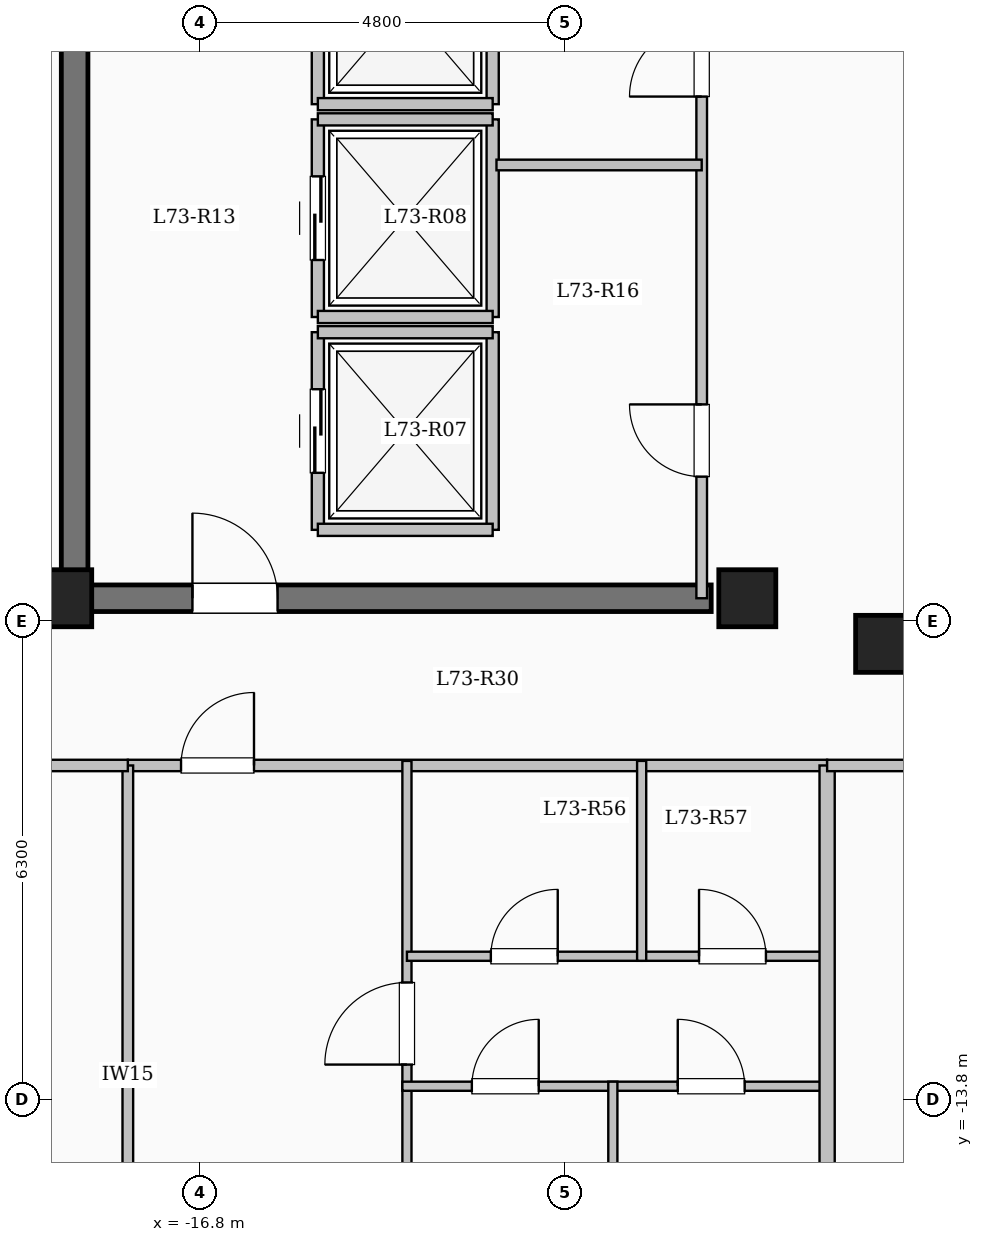
"""IFC4 building model, lengths in metres.
Left out: names, types, materials, properties, quantities, classifications, styles, units other than length and angle.
Written with IfcOpenShell. Run it as: python <this file> out.ifc"""

import sys

from ifc_helpers import new_model, si_unit, direction, frame, frame_2d, origin, origin_2d, place, context, subcontext, project, spatial, rectangle, extrude, element, fill, save


model = new_model("IFC4")
c1 = context("Model", 3, precision=1e-05, world=origin(), true_north=direction((0.0, 1.0)))
c2 = subcontext(c1, "Body", "Model", "MODEL_VIEW")
j1 = project(units=[si_unit("LENGTHUNIT", "METRE"), si_unit("PLANEANGLEUNIT", "RADIAN")], contexts=[c1])
p1 = place(None, origin())
s1 = spatial("IfcSite", under=j1, at=p1, CompositionType="ELEMENT")
p2 = place(p1, origin())
s2 = spatial("IfcBuilding", under=s1, at=p2, CompositionType="ELEMENT")
p3 = place(p2, frame((0.0, 0.0, 268.3)))
s3 = spatial("IfcBuildingStorey", under=s2, at=p3, CompositionType="ELEMENT", Elevation=268.3)
for number, where, z_axis, x_axis in (
    (1, (-7.8, -7.8, 0.0), (0.0, 0.0, 1.0), (1.0, 0.0, 0.0)),
    (2, (-9.6, -7.2, 0.0), (0.0, 0.0, 1.0), (1.0, 0.0, 0.0)),
    (3, (-18.6, -7.2, 0.0), (0.0, 0.0, 1.0), (1.0, 0.0, 0.0)),
):
    element("IfcColumn", number, at=place(p3, frame(where, z_axis=z_axis, x_axis=x_axis)), inside=s3, PredefinedType="COLUMN", context=c2, shape_type="SweptSolid", body=[
        extrude(rectangle(XDim=0.75, YDim=0.75, at=origin_2d()), origin(), (0.0, 0.0, 1.0), 3.35),
    ])
p4 = place(p3, frame((-15.25, -6.3, 0.0), z_axis=(0.0, 0.0, 1.0), x_axis=(0.0, 1.0, 0.0)))
e4 = element("IfcWall", 4, at=p4, inside=s3, PredefinedType="SOLIDWALL", context=c2, shape_type="SweptSolid", body=[
    extrude(rectangle(XDim=2.6, YDim=0.16, at=frame_2d((1.3, 0.0))), origin(), (0.0, 0.0, 1.0), 3.05),
])
p5 = place(p4, frame((0.75, 0.0, 0.0)))
e5 = element("IfcOpeningElement", 5, at=p5, cuts=e4, PredefinedType="OPENING", context=c2, shape_type="SweptSolid", body=[
    extrude(rectangle(XDim=1.1, YDim=2.15, at=frame_2d((0.55, 1.075))), frame((0.0, 0.09, 0.0), z_axis=(0.0, -1.0, 0.0), x_axis=(1.0, 0.0, 0.0)), (0.0, 0.0, 1.0), 0.18),
])
p6 = place(p3, frame((-12.95, -6.3, 0.0), z_axis=(0.0, 0.0, 1.0), x_axis=(0.0, 1.0, 0.0)))
e6 = element("IfcWall", 6, at=p6, inside=s3, PredefinedType="SOLIDWALL", context=c2, shape_type="SweptSolid", body=[
    extrude(rectangle(XDim=2.6, YDim=0.16, at=frame_2d((1.3, 0.0))), origin(), (0.0, 0.0, 1.0), 3.05),
])
for number, where, z_axis, x_axis in (
    (7, (-15.25, -6.3, 0.0), (0.0, 0.0, 1.0), (1.0, 0.0, 0.0)),
    (8, (-15.25, -3.7, 0.0), (0.0, 0.0, 1.0), (1.0, 0.0, 0.0)),
):
    element("IfcWall", number, at=place(p3, frame(where, z_axis=z_axis, x_axis=x_axis)), inside=s3, PredefinedType="SOLIDWALL", context=c2, shape_type="SweptSolid", body=[
        extrude(rectangle(XDim=2.3, YDim=0.16, at=frame_2d((1.15, 0.0))), origin(), (0.0, 0.0, 1.0), 3.05),
    ])
p7 = place(p3, frame((-15.25, -3.5, 0.0), z_axis=(0.0, 0.0, 1.0), x_axis=(0.0, 1.0, 0.0)))
e9 = element("IfcWall", 9, at=p7, inside=s3, PredefinedType="SOLIDWALL", context=c2, shape_type="SweptSolid", body=[
    extrude(rectangle(XDim=2.6, YDim=0.16, at=frame_2d((1.3, 0.0))), origin(), (0.0, 0.0, 1.0), 3.05),
])
p8 = place(p7, frame((0.75, 0.0, 0.0)))
e10 = element("IfcOpeningElement", 10, at=p8, cuts=e9, PredefinedType="OPENING", context=c2, shape_type="SweptSolid", body=[
    extrude(rectangle(XDim=1.1, YDim=2.15, at=frame_2d((0.55, 1.075))), frame((0.0, 0.09, 0.0), z_axis=(0.0, -1.0, 0.0), x_axis=(1.0, 0.0, 0.0)), (0.0, 0.0, 1.0), 0.18),
])
p9 = place(p3, frame((-12.95, -3.5, 0.0), z_axis=(0.0, 0.0, 1.0), x_axis=(0.0, 1.0, 0.0)))
e11 = element("IfcWall", 11, at=p9, inside=s3, PredefinedType="SOLIDWALL", context=c2, shape_type="SweptSolid", body=[
    extrude(rectangle(XDim=2.6, YDim=0.16, at=frame_2d((1.3, 0.0))), origin(), (0.0, 0.0, 1.0), 3.05),
])
for number, where, z_axis, x_axis in (
    (12, (-15.25, -3.5, 0.0), (0.0, 0.0, 1.0), (1.0, 0.0, 0.0)),
    (13, (-15.25, -0.9, 0.0), (0.0, 0.0, 1.0), (1.0, 0.0, 0.0)),
):
    element("IfcWall", number, at=place(p3, frame(where, z_axis=z_axis, x_axis=x_axis)), inside=s3, PredefinedType="SOLIDWALL", context=c2, shape_type="SweptSolid", body=[
        extrude(rectangle(XDim=2.3, YDim=0.16, at=frame_2d((1.15, 0.0))), origin(), (0.0, 0.0, 1.0), 3.05),
    ])
p10 = place(p3, frame((-15.25, -0.7, 0.0), z_axis=(0.0, 0.0, 1.0), x_axis=(0.0, 1.0, 0.0)))
e14 = element("IfcWall", 14, at=p10, inside=s3, PredefinedType="SOLIDWALL", context=c2, shape_type="SweptSolid", body=[
    extrude(rectangle(XDim=2.6, YDim=0.16, at=frame_2d((1.3, 0.0))), origin(), (0.0, 0.0, 1.0), 3.05),
])
p11 = place(p10, frame((0.75, 0.0, 0.0)))
e15 = element("IfcOpeningElement", 15, at=p11, cuts=e14, PredefinedType="OPENING", context=c2, shape_type="SweptSolid", body=[
    extrude(rectangle(XDim=1.1, YDim=2.15, at=frame_2d((0.55, 1.075))), frame((0.0, 0.09, 0.0), z_axis=(0.0, -1.0, 0.0), x_axis=(1.0, 0.0, 0.0)), (0.0, 0.0, 1.0), 0.18),
])
p12 = place(p3, frame((-12.95, -0.7, 0.0), z_axis=(0.0, 0.0, 1.0), x_axis=(0.0, 1.0, 0.0)))
e16 = element("IfcWall", 16, at=p12, inside=s3, PredefinedType="SOLIDWALL", context=c2, shape_type="SweptSolid", body=[
    extrude(rectangle(XDim=2.6, YDim=0.16, at=frame_2d((1.3, 0.0))), origin(), (0.0, 0.0, 1.0), 3.05),
])
p13 = place(p3, frame((-15.25, -0.7, 0.0), z_axis=(0.0, 0.0, 1.0), x_axis=(1.0, 0.0, 0.0)))
e17 = element("IfcWall", 17, at=p13, inside=s3, PredefinedType="SOLIDWALL", context=c2, shape_type="SweptSolid", body=[
    extrude(rectangle(XDim=2.3, YDim=0.16, at=frame_2d((1.15, 0.0))), origin(), (0.0, 0.0, 1.0), 3.05),
])
p14 = place(p3, frame((-18.45, -7.375, 0.0), z_axis=(0.0, 0.0, 1.0), x_axis=(0.0, 1.0, 0.0)))
e18 = element("IfcWall", 18, at=p14, inside=s3, PredefinedType="SHEAR", context=c2, shape_type="SweptSolid", body=[
    extrude(rectangle(XDim=14.05, YDim=0.35, at=frame_2d((7.025, 0.0))), origin(), (0.0, 0.0, 1.0), 3.35),
])
p15 = place(p3, frame((-18.625, -7.2, 0.0), z_axis=(0.0, 0.0, 1.0), x_axis=(1.0, 0.0, 0.0)))
e19 = element("IfcWall", 19, at=p15, inside=s3, PredefinedType="SHEAR", context=c2, shape_type="SweptSolid", body=[
    extrude(rectangle(XDim=8.55, YDim=0.35, at=frame_2d((4.275, 0.0))), origin(), (0.0, 0.0, 1.0), 3.35),
])
p16 = place(p15, frame((1.725, 0.0, 0.0)))
e20 = element("IfcOpeningElement", 20, at=p16, cuts=e19, PredefinedType="OPENING", context=c2, shape_type="SweptSolid", body=[
    extrude(rectangle(XDim=1.12, YDim=2.15, at=frame_2d((0.56, 1.075))), frame((0.0, 0.185, 0.0), z_axis=(0.0, -1.0, 0.0), x_axis=(1.0, 0.0, 0.0)), (0.0, 0.0, 1.0), 0.37),
])
p17 = place(p3, frame((-10.2, -7.2, 0.0), z_axis=(0.0, 0.0, 1.0), x_axis=(0.0, 1.0, 0.0)))
e21 = element("IfcWall", 21, at=p17, inside=s3, PredefinedType="PARTITIONING", context=c2, shape_type="SweptSolid", body=[
    extrude(rectangle(XDim=9.12, YDim=0.14, at=frame_2d((4.56, 0.0))), origin(), (0.0, 0.0, 1.0), 3.05),
])
p18 = place(p17, frame((1.6, 0.0, 0.0)))
e22 = element("IfcOpeningElement", 22, at=p18, cuts=e21, PredefinedType="OPENING", context=c2, shape_type="SweptSolid", body=[
    extrude(rectangle(XDim=0.95, YDim=2.12, at=frame_2d((0.475, 1.06))), frame((0.0, 0.08, 0.0), z_axis=(0.0, -1.0, 0.0), x_axis=(1.0, 0.0, 0.0)), (0.0, 0.0, 1.0), 0.16),
])
p19 = place(p17, frame((6.6, 0.0, 0.0)))
e23 = element("IfcOpeningElement", 23, at=p19, cuts=e21, PredefinedType="OPENING", context=c2, shape_type="SweptSolid", body=[
    extrude(rectangle(XDim=0.95, YDim=2.12, at=frame_2d((0.475, 1.06))), frame((0.0, 0.08, 0.0), z_axis=(0.0, -1.0, 0.0), x_axis=(1.0, 0.0, 0.0)), (0.0, 0.0, 1.0), 0.16),
])
p20 = place(p3, frame((-12.9, -1.5, 0.0), z_axis=(0.0, 0.0, 1.0), x_axis=(1.0, 0.0, 0.0)))
e24 = element("IfcWall", 24, at=p20, inside=s3, PredefinedType="PARTITIONING", context=c2, shape_type="SweptSolid", body=[
    extrude(rectangle(XDim=2.7, YDim=0.14, at=frame_2d((1.35, 0.0))), origin(), (0.0, 0.0, 1.0), 3.05),
])
p21 = place(p3, frame((-17.75, -9.4, 0.0), z_axis=(0.0, 0.0, 1.0), x_axis=(1.0, 0.0, 0.0)))
e25 = element("IfcWall", 25, at=p21, inside=s3, PredefinedType="PARTITIONING", context=c2, shape_type="SweptSolid", body=[
    extrude(rectangle(XDim=9.2, YDim=0.15, at=frame_2d((4.6, 0.0))), origin(), (0.0, 0.0, 1.0), 3.05),
])
p22 = place(p21, frame((0.7, 0.0, 0.0)))
e26 = element("IfcOpeningElement", 26, at=p22, cuts=e25, PredefinedType="OPENING", context=c2, shape_type="SweptSolid", body=[
    extrude(rectangle(XDim=0.96, YDim=2.15, at=frame_2d((0.48, 1.075))), frame((0.0, 0.085, 0.0), z_axis=(0.0, -1.0, 0.0), x_axis=(1.0, 0.0, 0.0)), (0.0, 0.0, 1.0), 0.17),
])
p23 = place(p3, frame((-14.078, -20.9, 0.0), z_axis=(0.0, 0.0, 1.0), x_axis=(0.0, 1.0, 0.0)))
e27 = element("IfcWall", 27, at=p23, inside=s3, PredefinedType="PARTITIONING", context=c2, shape_type="SweptSolid", body=[
    extrude(rectangle(XDim=11.56, YDim=0.12, at=frame_2d((5.78, 0.0))), origin(), (0.0, 0.0, 1.0), 3.05),
])
p24 = place(p23, frame((7.565, 0.0, 0.0)))
e28 = element("IfcOpeningElement", 28, at=p24, cuts=e27, PredefinedType="OPENING", context=c2, shape_type="SweptSolid", body=[
    extrude(rectangle(XDim=1.08, YDim=2.15, at=frame_2d((0.54, 1.075))), frame((0.0, 0.07, 0.0), z_axis=(0.0, -1.0, 0.0), x_axis=(1.0, 0.0, 0.0)), (0.0, 0.0, 1.0), 0.14),
])
p25 = place(p3, frame((-14.078, -11.91, 0.0), z_axis=(0.0, 0.0, 1.0), x_axis=(1.0, 0.0, 0.0)))
e29 = element("IfcWall", 29, at=p25, inside=s3, PredefinedType="PARTITIONING", context=c2, shape_type="SweptSolid", body=[
    extrude(rectangle(XDim=3.088, YDim=0.12, at=frame_2d((1.544, 0.0))), origin(), (0.0, 0.0, 1.0), 3.05),
])
p26 = place(p25, frame((1.104, 0.0, 0.0)))
e30 = element("IfcOpeningElement", 30, at=p26, cuts=e29, PredefinedType="OPENING", context=c2, shape_type="SweptSolid", body=[
    extrude(rectangle(XDim=0.88, YDim=2.1, at=frame_2d((0.44, 1.05))), frame((0.0, 0.07, 0.0), z_axis=(0.0, -1.0, 0.0), x_axis=(1.0, 0.0, 0.0)), (0.0, 0.0, 1.0), 0.14),
])
p27 = place(p3, frame((-10.99, -11.91, 0.0), z_axis=(0.0, 0.0, 1.0), x_axis=(1.0, 0.0, 0.0)))
e31 = element("IfcWall", 31, at=p27, inside=s3, PredefinedType="PARTITIONING", context=c2, shape_type="SweptSolid", body=[
    extrude(rectangle(XDim=2.39, YDim=0.12, at=frame_2d((1.195, 0.0))), origin(), (0.0, 0.0, 1.0), 3.05),
])
p28 = place(p27, frame((0.755, 0.0, 0.0)))
e32 = element("IfcOpeningElement", 32, at=p28, cuts=e31, PredefinedType="OPENING", context=c2, shape_type="SweptSolid", body=[
    extrude(rectangle(XDim=0.88, YDim=2.1, at=frame_2d((0.44, 1.05))), frame((0.0, 0.07, 0.0), z_axis=(0.0, -1.0, 0.0), x_axis=(1.0, 0.0, 0.0)), (0.0, 0.0, 1.0), 0.14),
])
p29 = place(p3, frame((-14.138, -13.62, 0.0), z_axis=(0.0, 0.0, 1.0), x_axis=(1.0, 0.0, 0.0)))
e33 = element("IfcWall", 33, at=p29, inside=s3, PredefinedType="PARTITIONING", context=c2, shape_type="SweptSolid", body=[
    extrude(rectangle(XDim=5.598, YDim=0.12, at=frame_2d((2.799, 0.0))), origin(), (0.0, 0.0, 1.0), 3.05),
])
p30 = place(p29, frame((0.914, 0.0, 0.0)))
e34 = element("IfcOpeningElement", 34, at=p30, cuts=e33, PredefinedType="OPENING", context=c2, shape_type="SweptSolid", body=[
    extrude(rectangle(XDim=0.88, YDim=2.1, at=frame_2d((0.44, 1.05))), frame((0.0, 0.07, 0.0), z_axis=(0.0, -1.0, 0.0), x_axis=(1.0, 0.0, 0.0)), (0.0, 0.0, 1.0), 0.14),
])
p31 = place(p29, frame((3.623, 0.0, 0.0)))
e35 = element("IfcOpeningElement", 35, at=p31, cuts=e33, PredefinedType="OPENING", context=c2, shape_type="SweptSolid", body=[
    extrude(rectangle(XDim=0.88, YDim=2.1, at=frame_2d((0.44, 1.05))), frame((0.0, 0.07, 0.0), z_axis=(0.0, -1.0, 0.0), x_axis=(1.0, 0.0, 0.0)), (0.0, 0.0, 1.0), 0.14),
])
p32 = place(p3, frame((-10.99, -11.97, 0.0), z_axis=(0.0, 0.0, 1.0), x_axis=(0.0, 1.0, 0.0)))
e36 = element("IfcWall", 36, at=p32, inside=s3, PredefinedType="PARTITIONING", context=c2, shape_type="SweptSolid", body=[
    extrude(rectangle(XDim=2.63, YDim=0.12, at=frame_2d((1.315, 0.0))), origin(), (0.0, 0.0, 1.0), 3.05),
])
p33 = place(p3, frame((-11.369, -20.9, 0.0), z_axis=(0.0, 0.0, 1.0), x_axis=(0.0, 1.0, 0.0)))
e37 = element("IfcWall", 37, at=p33, inside=s3, PredefinedType="PARTITIONING", context=c2, shape_type="SweptSolid", body=[
    extrude(rectangle(XDim=7.34, YDim=0.12, at=frame_2d((3.67, 0.0))), origin(), (0.0, 0.0, 1.0), 3.05),
])
p34 = place(p3, frame((-8.55, -21.504, 0.0), z_axis=(0.0, 0.0, 1.0), x_axis=(0.0, 1.0, 0.0)))
e38 = element("IfcWall", 38, at=p34, inside=s3, PredefinedType="SOLIDWALL", context=c2, shape_type="SweptSolid", body=[
    extrude(rectangle(XDim=12.104, YDim=0.2, at=frame_2d((6.052, 0.0))), origin(), (0.0, 0.0, 1.0), 3.05),
])
p35 = place(p3, frame((-8.55, -9.4, 0.0), z_axis=(0.0, 0.0, 1.0), x_axis=(1.0, 0.0, 0.0)))
e39 = element("IfcWall", 39, at=p35, inside=s3, PredefinedType="PARTITIONING", context=c2, shape_type="SweptSolid", body=[
    extrude(rectangle(XDim=17.1, YDim=0.15, at=frame_2d((8.55, 0.0))), origin(), (0.0, 0.0, 1.0), 3.05),
])
p36 = place(p35, frame((1.75, 0.0, 0.0)))
e40 = element("IfcOpeningElement", 40, at=p36, cuts=e39, PredefinedType="OPENING", context=c2, shape_type="SweptSolid", body=[
    extrude(rectangle(XDim=0.96, YDim=2.15, at=frame_2d((0.48, 1.075))), frame((0.0, 0.085, 0.0), z_axis=(0.0, -1.0, 0.0), x_axis=(1.0, 0.0, 0.0)), (0.0, 0.0, 1.0), 0.17),
])
p37 = place(p3, frame((-22.68, -7.25, 0.0), z_axis=(0.0, 0.0, 1.0), x_axis=(1.0, 0.0, 0.0)))
e41 = element("IfcWall", 41, at=p37, inside=s3, PredefinedType="PARTITIONING", context=c2, shape_type="SweptSolid", body=[
    extrude(rectangle(XDim=4.23, YDim=0.15, at=frame_2d((2.115, 0.0))), origin(), (0.0, 0.0, 1.0), 3.05),
])
p38 = place(p37, frame((1.73, 0.0, 0.0)))
e42 = element("IfcOpeningElement", 42, at=p38, cuts=e41, PredefinedType="OPENING", context=c2, shape_type="SweptSolid", body=[
    extrude(rectangle(XDim=0.96, YDim=2.15, at=frame_2d((0.48, 1.075))), frame((0.0, 0.085, 0.0), z_axis=(0.0, -1.0, 0.0), x_axis=(1.0, 0.0, 0.0)), (0.0, 0.0, 1.0), 0.17),
])
p39 = place(p3, frame((-17.75, -17.55, 0.0), z_axis=(0.0, 0.0, 1.0), x_axis=(0.0, 1.0, 0.0)))
e43 = element("IfcWall", 43, at=p39, inside=s3, PredefinedType="PARTITIONING", context=c2, shape_type="SweptSolid", body=[
    extrude(rectangle(XDim=8.15, YDim=0.14, at=frame_2d((4.075, 0.0))), origin(), (0.0, 0.0, 1.0), 3.05),
])
p40 = place(p3, frame((-22.68, -9.4, 0.0), z_axis=(0.0, 0.0, 1.0), x_axis=(1.0, 0.0, 0.0)))
e44 = element("IfcWall", 44, at=p40, inside=s3, PredefinedType="PARTITIONING", context=c2, shape_type="SweptSolid", body=[
    extrude(rectangle(XDim=4.93, YDim=0.15, at=frame_2d((2.465, 0.0))), origin(), (0.0, 0.0, 1.0), 3.05),
])
p41 = place(p40, frame((1.99, 0.0, 0.0)))
e45 = element("IfcOpeningElement", 45, at=p41, cuts=e44, PredefinedType="OPENING", context=c2, shape_type="SweptSolid", body=[
    extrude(rectangle(XDim=0.95, YDim=2.15, at=frame_2d((0.475, 1.075))), frame((0.0, 0.085, 0.0), z_axis=(0.0, -1.0, 0.0), x_axis=(1.0, 0.0, 0.0)), (0.0, 0.0, 1.0), 0.17),
])
p42 = place(p5, origin())
e46 = element("IfcDoor", 46, at=p42, inside=s3, OperationType="SLIDING_TO_LEFT", PredefinedType="DOOR", context=c2, shape_type="SweptSolid", body=[
    extrude(rectangle(XDim=1.1, YDim=2.15, at=frame_2d((0.55, 1.075))), frame((0.0, 0.025, 0.0), z_axis=(0.0, -1.0, 0.0), x_axis=(1.0, 0.0, 0.0)), (0.0, 0.0, 1.0), 0.05),
])
fill(e5, e46)
p43 = place(p8, origin())
e47 = element("IfcDoor", 47, at=p43, inside=s3, OperationType="SLIDING_TO_LEFT", PredefinedType="DOOR", context=c2, shape_type="SweptSolid", body=[
    extrude(rectangle(XDim=1.1, YDim=2.15, at=frame_2d((0.55, 1.075))), frame((0.0, 0.025, 0.0), z_axis=(0.0, -1.0, 0.0), x_axis=(1.0, 0.0, 0.0)), (0.0, 0.0, 1.0), 0.05),
])
fill(e10, e47)
p44 = place(p16, origin())
e48 = element("IfcDoor", 48, at=p44, inside=s3, OperationType="SINGLE_SWING_LEFT", PredefinedType="DOOR", context=c2, shape_type="SweptSolid", body=[
    extrude(rectangle(XDim=1.12, YDim=2.15, at=frame_2d((0.56, 1.075))), frame((0.0, 0.025, 0.0), z_axis=(0.0, -1.0, 0.0), x_axis=(1.0, 0.0, 0.0)), (0.0, 0.0, 1.0), 0.05),
])
fill(e20, e48)
p45 = place(p18, origin())
e49 = element("IfcDoor", 49, at=p45, inside=s3, OperationType="SINGLE_SWING_RIGHT", PredefinedType="DOOR", context=c2, shape_type="SweptSolid", body=[
    extrude(rectangle(XDim=0.95, YDim=2.12, at=frame_2d((0.475, 1.06))), frame((0.0, 0.025, 0.0), z_axis=(0.0, -1.0, 0.0), x_axis=(1.0, 0.0, 0.0)), (0.0, 0.0, 1.0), 0.05),
])
fill(e22, e49)
p46 = place(p19, origin())
e50 = element("IfcDoor", 50, at=p46, inside=s3, OperationType="SINGLE_SWING_LEFT", PredefinedType="DOOR", context=c2, shape_type="SweptSolid", body=[
    extrude(rectangle(XDim=0.95, YDim=2.12, at=frame_2d((0.475, 1.06))), frame((0.0, 0.025, 0.0), z_axis=(0.0, -1.0, 0.0), x_axis=(1.0, 0.0, 0.0)), (0.0, 0.0, 1.0), 0.05),
])
fill(e23, e50)
p47 = place(p22, origin())
e51 = element("IfcDoor", 51, at=p47, inside=s3, OperationType="SINGLE_SWING_RIGHT", PredefinedType="DOOR", context=c2, shape_type="SweptSolid", body=[
    extrude(rectangle(XDim=0.96, YDim=2.15, at=frame_2d((0.48, 1.075))), frame((0.0, 0.025, 0.0), z_axis=(0.0, -1.0, 0.0), x_axis=(1.0, 0.0, 0.0)), (0.0, 0.0, 1.0), 0.05),
])
fill(e26, e51)
p48 = place(p24, origin())
e52 = element("IfcDoor", 52, at=p48, inside=s3, OperationType="SINGLE_SWING_LEFT", PredefinedType="DOOR", context=c2, shape_type="SweptSolid", body=[
    extrude(rectangle(XDim=1.08, YDim=2.15, at=frame_2d((0.54, 1.075))), frame((0.0, 0.025, 0.0), z_axis=(0.0, -1.0, 0.0), x_axis=(1.0, 0.0, 0.0)), (0.0, 0.0, 1.0), 0.05),
])
fill(e28, e52)
p49 = place(p26, origin())
e53 = element("IfcDoor", 53, at=p49, inside=s3, OperationType="SINGLE_SWING_RIGHT", PredefinedType="DOOR", context=c2, shape_type="SweptSolid", body=[
    extrude(rectangle(XDim=0.88, YDim=2.1, at=frame_2d((0.44, 1.05))), frame((0.0, 0.025, 0.0), z_axis=(0.0, -1.0, 0.0), x_axis=(1.0, 0.0, 0.0)), (0.0, 0.0, 1.0), 0.05),
])
fill(e30, e53)
p50 = place(p28, origin())
e54 = element("IfcDoor", 54, at=p50, inside=s3, OperationType="SINGLE_SWING_LEFT", PredefinedType="DOOR", context=c2, shape_type="SweptSolid", body=[
    extrude(rectangle(XDim=0.88, YDim=2.1, at=frame_2d((0.44, 1.05))), frame((0.0, 0.025, 0.0), z_axis=(0.0, -1.0, 0.0), x_axis=(1.0, 0.0, 0.0)), (0.0, 0.0, 1.0), 0.05),
])
fill(e32, e54)
p51 = place(p30, origin())
e55 = element("IfcDoor", 55, at=p51, inside=s3, OperationType="SINGLE_SWING_RIGHT", PredefinedType="DOOR", context=c2, shape_type="SweptSolid", body=[
    extrude(rectangle(XDim=0.88, YDim=2.1, at=frame_2d((0.44, 1.05))), frame((0.0, 0.025, 0.0), z_axis=(0.0, -1.0, 0.0), x_axis=(1.0, 0.0, 0.0)), (0.0, 0.0, 1.0), 0.05),
])
fill(e34, e55)
p52 = place(p31, origin())
e56 = element("IfcDoor", 56, at=p52, inside=s3, OperationType="SINGLE_SWING_LEFT", PredefinedType="DOOR", context=c2, shape_type="SweptSolid", body=[
    extrude(rectangle(XDim=0.88, YDim=2.1, at=frame_2d((0.44, 1.05))), frame((0.0, 0.025, 0.0), z_axis=(0.0, -1.0, 0.0), x_axis=(1.0, 0.0, 0.0)), (0.0, 0.0, 1.0), 0.05),
])
fill(e35, e56)
save(model, sys.argv[1])
